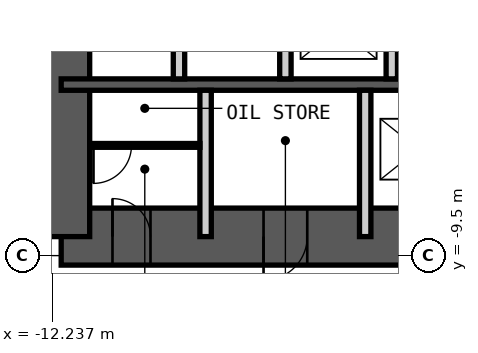
"""IFC4 building model, lengths in metres.
Left out: names, types, materials, properties, quantities, classifications, styles, units other than length and angle.
Written with IfcOpenShell. Run it as: python <this file> out.ifc"""

import sys

from ifc_helpers import new_model, si_unit, direction, frame, frame_2d, origin, place, context, subcontext, project, spatial, rectangle, extrude, element, fill, save


model = new_model("IFC4")
c1 = context("Model", 3, precision=1e-05, world=origin(), true_north=direction((0.0, 1.0)))
c2 = subcontext(c1, "Body", "Model", "MODEL_VIEW")
j1 = project(units=[si_unit("LENGTHUNIT", "METRE"), si_unit("PLANEANGLEUNIT", "RADIAN")], contexts=[c1])
p1 = place(None, origin())
s1 = spatial("IfcSite", under=j1, at=p1, CompositionType="ELEMENT")
p2 = place(p1, origin())
s2 = spatial("IfcBuilding", under=s1, at=p2, CompositionType="ELEMENT")
p3 = place(p2, frame((0.0, 0.0, 174.4)))
s3 = spatial("IfcBuildingStorey", under=s2, at=p3, CompositionType="ELEMENT", Elevation=174.4)
p4 = place(p3, frame((-12.0, -9.0, 0.0), z_axis=(0.0, 0.0, 1.0), x_axis=(1.0, 0.0, 0.0)))
e1 = element("IfcWall", 1, at=p4, inside=s3, PredefinedType="SHEAR", context=c2, shape_type="SweptSolid", body=[
    extrude(rectangle(XDim=24.0, YDim=1.5, at=frame_2d((12.0, 0.0))), origin(), (0.0, 0.0, 1.0), 6.0),
])
p5 = place(p4, frame((1.35, 0.0, 0.0)))
e2 = element("IfcOpeningElement", 2, at=p5, cuts=e1, PredefinedType="OPENING", context=c2, shape_type="SweptSolid", body=[
    extrude(rectangle(XDim=1.0, YDim=2.1, at=frame_2d((0.5, 1.05))), frame((0.0, 0.76, 0.0), z_axis=(0.0, -1.0, 0.0), x_axis=(1.0, 0.0, 0.0)), (0.0, 0.0, 1.0), 1.52),
])
p6 = place(p4, frame((5.325, 0.0, 0.0)))
e3 = element("IfcOpeningElement", 3, at=p6, cuts=e1, PredefinedType="OPENING", context=c2, shape_type="SweptSolid", body=[
    extrude(rectangle(XDim=1.15, YDim=2.1, at=frame_2d((0.575, 1.05))), frame((0.0, 0.76, 0.0), z_axis=(0.0, -1.0, 0.0), x_axis=(1.0, 0.0, 0.0)), (0.0, 0.0, 1.0), 1.52),
])
p7 = place(p4, frame((12.6, 0.0, 0.0)))
e4 = element("IfcOpeningElement", 4, at=p7, cuts=e1, PredefinedType="OPENING", context=c2, shape_type="SweptSolid", body=[
    extrude(rectangle(XDim=1.0, YDim=2.1, at=frame_2d((0.5, 1.05))), frame((0.0, 0.76, 0.0), z_axis=(0.0, -1.0, 0.0), x_axis=(1.0, 0.0, 0.0)), (0.0, 0.0, 1.0), 1.52),
])
p8 = place(p3, frame((-12.0, -9.0, 0.0), z_axis=(0.0, 0.0, 1.0), x_axis=(0.0, 1.0, 0.0)))
e5 = element("IfcWall", 5, at=p8, inside=s3, PredefinedType="SHEAR", context=c2, shape_type="SweptSolid", body=[
    extrude(rectangle(XDim=18.0, YDim=1.5, at=frame_2d((9.0, 0.0))), origin(), (0.0, 0.0, 1.0), 6.0),
])
p9 = place(p8, frame((8.1, 0.0, 0.0)))
e6 = element("IfcOpeningElement", 6, at=p9, cuts=e5, PredefinedType="OPENING", context=c2, shape_type="SweptSolid", body=[
    extrude(rectangle(XDim=1.8, YDim=2.1, at=frame_2d((0.9, 1.05))), frame((0.0, 0.76, 0.0), z_axis=(0.0, -1.0, 0.0), x_axis=(1.0, 0.0, 0.0)), (0.0, 0.0, 1.0), 1.52),
])
p10 = place(p3, frame((-12.0, -5.0, 0.0), z_axis=(0.0, 0.0, 1.0), x_axis=(1.0, 0.0, 0.0)))
e7 = element("IfcWall", 7, at=p10, inside=s3, PredefinedType="SHEAR", context=c2, shape_type="SweptSolid", body=[
    extrude(rectangle(XDim=24.0, YDim=0.3, at=frame_2d((12.0, 0.0))), origin(), (0.0, 0.0, 1.0), 6.0),
])
for number, where, z_axis, x_axis in (
    (8, (-8.9, -4.85, 0.0), (0.0, 0.0, 1.0), (0.0, 1.0, 0.0)),
    (9, (-6.1, -4.85, 0.0), (0.0, 0.0, 1.0), (0.0, 1.0, 0.0)),
    (10, (-3.3, -4.85, 0.0), (0.0, 0.0, 1.0), (0.0, 1.0, 0.0)),
):
    element("IfcWall", number, at=place(p3, frame(where, z_axis=z_axis, x_axis=x_axis)), inside=s3, PredefinedType="PARTITIONING", context=c2, shape_type="SweptSolid", body=[
        extrude(rectangle(XDim=2.65, YDim=0.3, at=frame_2d((1.325, 0.0))), origin(), (0.0, 0.0, 1.0), 5.78),
    ])
for number, where, z_axis, x_axis in (
    (11, (-8.2, -9.0, 0.0), (0.0, 0.0, 1.0), (0.0, 1.0, 0.0)),
    (12, (-4.0, -9.0, 0.0), (0.0, 0.0, 1.0), (0.0, 1.0, 0.0)),
):
    element("IfcWall", number, at=place(p3, frame(where, z_axis=z_axis, x_axis=x_axis)), inside=s3, PredefinedType="PARTITIONING", context=c2, shape_type="SweptSolid", body=[
        extrude(rectangle(XDim=3.85, YDim=0.3, at=frame_2d((1.925, 0.0))), origin(), (0.0, 0.0, 1.0), 5.78),
    ])
p11 = place(p3, frame((-11.25, -6.6, 0.0), z_axis=(0.0, 0.0, 1.0), x_axis=(1.0, 0.0, 0.0)))
e13 = element("IfcWall", 13, at=p11, inside=s3, PredefinedType="PARTITIONING", context=c2, shape_type="SweptSolid", body=[
    extrude(rectangle(XDim=2.9, YDim=0.1, at=frame_2d((1.45, 0.0))), origin(), (0.0, 0.0, 1.0), 5.78),
])
p12 = place(p11, frame((0.1, 0.0, 0.0)))
e14 = element("IfcOpeningElement", 14, at=p12, cuts=e13, PredefinedType="OPENING", context=c2, shape_type="SweptSolid", body=[
    extrude(rectangle(XDim=1.0, YDim=2.4, at=frame_2d((0.5, 1.2))), frame((0.0, 0.06, 0.0), z_axis=(0.0, -1.0, 0.0), x_axis=(1.0, 0.0, 0.0)), (0.0, 0.0, 1.0), 0.12),
])
p13 = place(p5, origin())
e15 = element("IfcDoor", 15, at=p13, inside=s3, OperationType="SINGLE_SWING_RIGHT", PredefinedType="DOOR", context=c2, shape_type="SweptSolid", body=[
    extrude(rectangle(XDim=1.0, YDim=2.1, at=frame_2d((0.5, 1.05))), frame((0.0, 0.025, 0.0), z_axis=(0.0, -1.0, 0.0), x_axis=(1.0, 0.0, 0.0)), (0.0, 0.0, 1.0), 0.05),
])
fill(e2, e15)
p14 = place(p6, origin())
e16 = element("IfcDoor", 16, at=p14, inside=s3, OperationType="SINGLE_SWING_LEFT", PredefinedType="DOOR", context=c2, shape_type="SweptSolid", body=[
    extrude(rectangle(XDim=1.15, YDim=2.1, at=frame_2d((0.575, 1.05))), frame((0.0, 0.025, 0.0), z_axis=(0.0, -1.0, 0.0), x_axis=(1.0, 0.0, 0.0)), (0.0, 0.0, 1.0), 0.05),
])
fill(e3, e16)
p15 = place(p12, origin())
e17 = element("IfcDoor", 17, at=p15, inside=s3, OperationType="SINGLE_SWING_LEFT", PredefinedType="DOOR", context=c2, shape_type="SweptSolid", body=[
    extrude(rectangle(XDim=1.0, YDim=2.4, at=frame_2d((0.5, 1.2))), frame((0.0, 0.025, 0.0), z_axis=(0.0, -1.0, 0.0), x_axis=(1.0, 0.0, 0.0)), (0.0, 0.0, 1.0), 0.05),
])
fill(e14, e17)
save(model, sys.argv[1])
